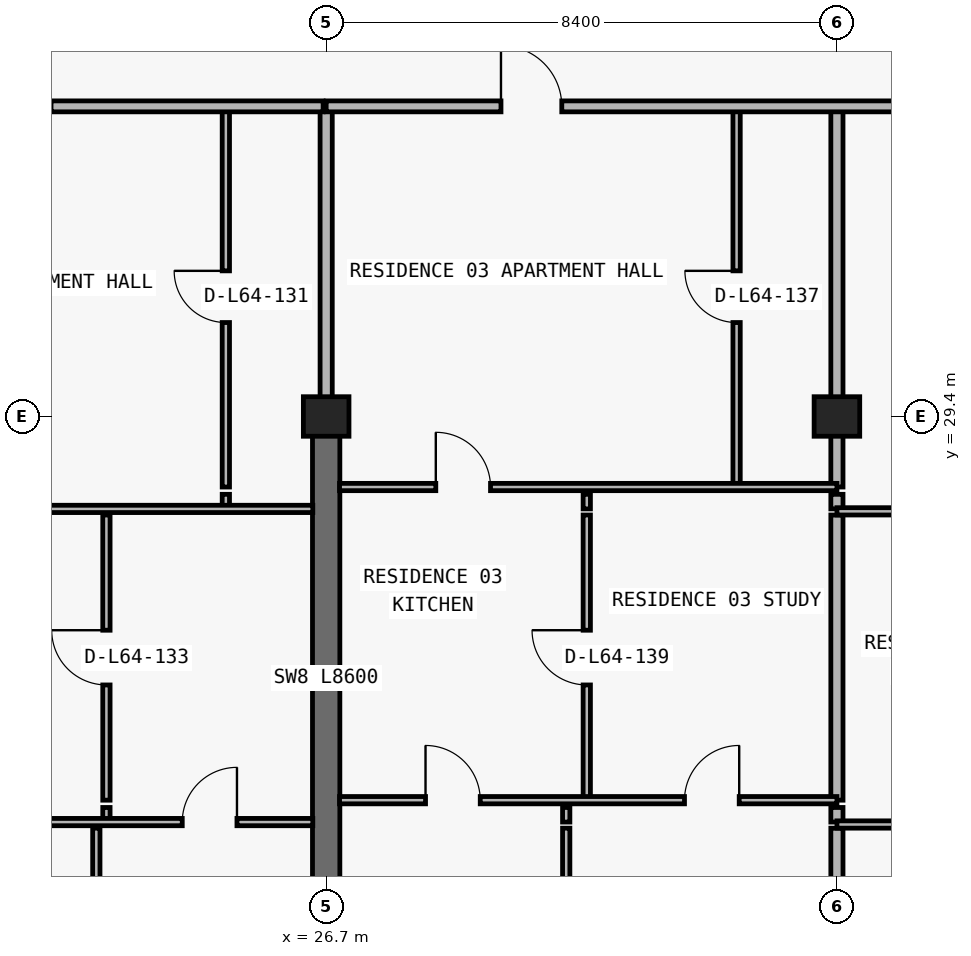
"""IFC4 building model, lengths in metres.
Left out: names, types, materials, properties, quantities, classifications, styles, units other than length and angle.
Written with IfcOpenShell. Run it as: python <this file> out.ifc"""

import sys

from ifc_helpers import new_model, si_unit, direction, frame, frame_2d, origin, origin_2d, place, context, subcontext, project, spatial, rectangle, extrude, element, fill, save


model = new_model("IFC4")
c1 = context("Model", 3, precision=1e-05, world=origin(), true_north=direction((0.0, 1.0)))
c2 = subcontext(c1, "Body", "Model", "MODEL_VIEW")
j1 = project(units=[si_unit("LENGTHUNIT", "METRE"), si_unit("PLANEANGLEUNIT", "RADIAN")], contexts=[c1])
p1 = place(None, origin())
s1 = spatial("IfcSite", under=j1, at=p1, CompositionType="ELEMENT")
p2 = place(p1, origin())
s2 = spatial("IfcBuilding", under=s1, at=p2, CompositionType="ELEMENT")
p3 = place(p2, frame((0.0, 0.0, 229.8)))
s3 = spatial("IfcBuildingStorey", under=s2, at=p3, CompositionType="ELEMENT", Elevation=229.8)
for number, where, z_axis, x_axis in (
    (1, (26.7, 29.4, 0.0), (0.0, 0.0, 1.0), (1.0, 0.0, 0.0)),
    (2, (35.1, 29.4, 0.0), (0.0, 0.0, 1.0), (1.0, 0.0, 0.0)),
):
    element("IfcColumn", number, at=place(p3, frame(where, z_axis=z_axis, x_axis=x_axis)), inside=s3, PredefinedType="COLUMN", context=c2, shape_type="SweptSolid", body=[
        extrude(rectangle(XDim=0.75, YDim=0.65, at=origin_2d()), origin(), (0.0, 0.0, 1.0), 3.05),
    ])
p4 = place(p3, frame((26.7, 20.8, 0.0), z_axis=(0.0, 0.0, 1.0), x_axis=(0.0, 1.0, 0.0)))
e3 = element("IfcWall", 3, at=p4, inside=s3, PredefinedType="SHEAR", context=c2, shape_type="SweptSolid", body=[
    extrude(rectangle(XDim=8.6, YDim=0.45, at=frame_2d((4.3, 0.0))), origin(), (0.0, 0.0, 1.0), 3.05),
])
p5 = place(p3, frame((22.92, 13.34, 0.0), z_axis=(0.0, 0.0, 1.0), x_axis=(0.0, 1.0, 0.0)))
e4 = element("IfcWall", 4, at=p5, inside=s3, PredefinedType="PARTITIONING", context=c2, shape_type="SweptSolid", body=[
    extrude(rectangle(XDim=9.29, YDim=0.12, at=frame_2d((4.645, 0.0))), origin(), (0.0, 0.0, 1.0), 3.05),
])
p6 = place(p3, frame((23.086, 22.73, 0.0), z_axis=(0.0, 0.0, 1.0), x_axis=(0.0, 1.0, 0.0)))
e5 = element("IfcWall", 5, at=p6, inside=s3, PredefinedType="PARTITIONING", context=c2, shape_type="SweptSolid", body=[
    extrude(rectangle(XDim=0.24, YDim=0.12, at=frame_2d((0.12, 0.0))), origin(), (0.0, 0.0, 1.0), 3.05),
])
p7 = place(p3, frame((23.086, 23.09, 0.0), z_axis=(0.0, 0.0, 1.0), x_axis=(0.0, 1.0, 0.0)))
e6 = element("IfcWall", 6, at=p7, inside=s3, PredefinedType="PARTITIONING", context=c2, shape_type="SweptSolid", body=[
    extrude(rectangle(XDim=4.69, YDim=0.12, at=frame_2d((2.345, 0.0))), origin(), (0.0, 0.0, 1.0), 3.05),
])
p8 = place(p7, frame((1.895, 0.0, 0.0)))
e7 = element("IfcOpeningElement", 7, at=p8, cuts=e6, PredefinedType="OPENING", context=c2, shape_type="SweptSolid", body=[
    extrude(rectangle(XDim=0.9, YDim=2.15, at=frame_2d((0.45, 1.075))), frame((0.0, 0.07, 0.0), z_axis=(0.0, -1.0, 0.0), x_axis=(1.0, 0.0, 0.0)), (0.0, 0.0, 1.0), 0.14),
])
p9 = place(p3, frame((25.05, 27.88, 0.0), z_axis=(0.0, 0.0, 1.0), x_axis=(0.0, 1.0, 0.0)))
e8 = element("IfcWall", 8, at=p9, inside=s3, PredefinedType="PARTITIONING", context=c2, shape_type="SweptSolid", body=[
    extrude(rectangle(XDim=0.24, YDim=0.12, at=frame_2d((0.12, 0.0))), origin(), (0.0, 0.0, 1.0), 3.05),
])
p10 = place(p3, frame((25.05, 28.24, 0.0), z_axis=(0.0, 0.0, 1.0), x_axis=(0.0, 1.0, 0.0)))
e9 = element("IfcWall", 9, at=p10, inside=s3, PredefinedType="PARTITIONING", context=c2, shape_type="SweptSolid", body=[
    extrude(rectangle(XDim=6.26, YDim=0.12, at=frame_2d((3.13, 0.0))), origin(), (0.0, 0.0, 1.0), 3.05),
])
p11 = place(p10, frame((2.705, 0.0, 0.0)))
e10 = element("IfcOpeningElement", 10, at=p11, cuts=e9, PredefinedType="OPENING", context=c2, shape_type="SweptSolid", body=[
    extrude(rectangle(XDim=0.85, YDim=2.1, at=frame_2d((0.425, 1.05))), frame((0.0, 0.07, 0.0), z_axis=(0.0, -1.0, 0.0), x_axis=(1.0, 0.0, 0.0)), (0.0, 0.0, 1.0), 0.14),
])
p12 = place(p3, frame((26.7, 29.405, 0.0), z_axis=(0.0, 0.0, 1.0), x_axis=(0.0, 1.0, 0.0)))
e11 = element("IfcWall", 11, at=p12, inside=s3, PredefinedType="PARTITIONING", context=c2, shape_type="SweptSolid", body=[
    extrude(rectangle(XDim=5.095, YDim=0.2, at=frame_2d((2.547, 0.0))), origin(), (0.0, 0.0, 1.0), 2.335),
])
p13 = place(p3, frame((30.648, 13.34, 0.0), z_axis=(0.0, 0.0, 1.0), x_axis=(0.0, 1.0, 0.0)))
e12 = element("IfcWall", 12, at=p13, inside=s3, PredefinedType="PARTITIONING", context=c2, shape_type="SweptSolid", body=[
    extrude(rectangle(XDim=9.29, YDim=0.12, at=frame_2d((4.645, 0.0))), origin(), (0.0, 0.0, 1.0), 3.05),
])
p14 = place(p3, frame((30.648, 22.73, 0.0), z_axis=(0.0, 0.0, 1.0), x_axis=(0.0, 1.0, 0.0)))
e13 = element("IfcWall", 13, at=p14, inside=s3, PredefinedType="PARTITIONING", context=c2, shape_type="SweptSolid", body=[
    extrude(rectangle(XDim=0.24, YDim=0.12, at=frame_2d((0.12, 0.0))), origin(), (0.0, 0.0, 1.0), 3.05),
])
p15 = place(p3, frame((30.986, 23.09, 0.0), z_axis=(0.0, 0.0, 1.0), x_axis=(0.0, 1.0, 0.0)))
e14 = element("IfcWall", 14, at=p15, inside=s3, PredefinedType="PARTITIONING", context=c2, shape_type="SweptSolid", body=[
    extrude(rectangle(XDim=4.69, YDim=0.12, at=frame_2d((2.345, 0.0))), origin(), (0.0, 0.0, 1.0), 3.05),
])
p16 = place(p15, frame((1.895, 0.0, 0.0)))
e15 = element("IfcOpeningElement", 15, at=p16, cuts=e14, PredefinedType="OPENING", context=c2, shape_type="SweptSolid", body=[
    extrude(rectangle(XDim=0.9, YDim=2.15, at=frame_2d((0.45, 1.075))), frame((0.0, 0.07, 0.0), z_axis=(0.0, -1.0, 0.0), x_axis=(1.0, 0.0, 0.0)), (0.0, 0.0, 1.0), 0.14),
])
p17 = place(p3, frame((30.986, 27.88, 0.0), z_axis=(0.0, 0.0, 1.0), x_axis=(0.0, 1.0, 0.0)))
e16 = element("IfcWall", 16, at=p17, inside=s3, PredefinedType="PARTITIONING", context=c2, shape_type="SweptSolid", body=[
    extrude(rectangle(XDim=0.24, YDim=0.12, at=frame_2d((0.12, 0.0))), origin(), (0.0, 0.0, 1.0), 3.05),
])
p18 = place(p3, frame((33.45, 28.24, 0.0), z_axis=(0.0, 0.0, 1.0), x_axis=(0.0, 1.0, 0.0)))
e17 = element("IfcWall", 17, at=p18, inside=s3, PredefinedType="PARTITIONING", context=c2, shape_type="SweptSolid", body=[
    extrude(rectangle(XDim=6.26, YDim=0.12, at=frame_2d((3.13, 0.0))), origin(), (0.0, 0.0, 1.0), 3.05),
])
p19 = place(p18, frame((2.705, 0.0, 0.0)))
e18 = element("IfcOpeningElement", 18, at=p19, cuts=e17, PredefinedType="OPENING", context=c2, shape_type="SweptSolid", body=[
    extrude(rectangle(XDim=0.85, YDim=2.1, at=frame_2d((0.425, 1.05))), frame((0.0, 0.07, 0.0), z_axis=(0.0, -1.0, 0.0), x_axis=(1.0, 0.0, 0.0)), (0.0, 0.0, 1.0), 0.14),
])
p20 = place(p3, frame((35.1, 13.34, 0.0), z_axis=(0.0, 0.0, 1.0), x_axis=(0.0, 1.0, 0.0)))
e19 = element("IfcWall", 19, at=p20, inside=s3, PredefinedType="PARTITIONING", context=c2, shape_type="SweptSolid", body=[
    extrude(rectangle(XDim=9.29, YDim=0.2, at=frame_2d((4.645, 0.0))), origin(), (0.0, 0.0, 1.0), 2.263),
])
p21 = place(p3, frame((35.1, 22.73, 0.0), z_axis=(0.0, 0.0, 1.0), x_axis=(0.0, 1.0, 0.0)))
e20 = element("IfcWall", 20, at=p21, inside=s3, PredefinedType="PARTITIONING", context=c2, shape_type="SweptSolid", body=[
    extrude(rectangle(XDim=0.24, YDim=0.2, at=frame_2d((0.12, 0.0))), origin(), (0.0, 0.0, 1.0), 2.263),
])
p22 = place(p3, frame((35.1, 23.09, 0.0), z_axis=(0.0, 0.0, 1.0), x_axis=(0.0, 1.0, 0.0)))
e21 = element("IfcWall", 21, at=p22, inside=s3, PredefinedType="PARTITIONING", context=c2, shape_type="SweptSolid", body=[
    extrude(rectangle(XDim=4.69, YDim=0.2, at=frame_2d((2.345, 0.0))), origin(), (0.0, 0.0, 1.0), 2.263),
])
p23 = place(p3, frame((35.1, 27.88, 0.0), z_axis=(0.0, 0.0, 1.0), x_axis=(0.0, 1.0, 0.0)))
e22 = element("IfcWall", 22, at=p23, inside=s3, PredefinedType="PARTITIONING", context=c2, shape_type="SweptSolid", body=[
    extrude(rectangle(XDim=0.24, YDim=0.2, at=frame_2d((0.12, 0.0))), origin(), (0.0, 0.0, 1.0), 2.263),
])
p24 = place(p3, frame((35.1, 28.24, 0.0), z_axis=(0.0, 0.0, 1.0), x_axis=(0.0, 1.0, 0.0)))
e23 = element("IfcWall", 23, at=p24, inside=s3, PredefinedType="PARTITIONING", context=c2, shape_type="SweptSolid", body=[
    extrude(rectangle(XDim=6.26, YDim=0.2, at=frame_2d((3.13, 0.0))), origin(), (0.0, 0.0, 1.0), 2.263),
])
p25 = place(p3, frame((35.1, 22.69, 0.0), z_axis=(0.0, 0.0, 1.0), x_axis=(1.0, 0.0, 0.0)))
e24 = element("IfcWall", 24, at=p25, inside=s3, PredefinedType="PARTITIONING", context=c2, shape_type="SweptSolid", body=[
    extrude(rectangle(XDim=4.104, YDim=0.12, at=frame_2d((2.052, 0.0))), origin(), (0.0, 0.0, 1.0), 3.05),
])
p26 = place(p25, frame((1.602, 0.0, 0.0)))
e25 = element("IfcOpeningElement", 25, at=p26, cuts=e24, PredefinedType="OPENING", context=c2, shape_type="SweptSolid", body=[
    extrude(rectangle(XDim=0.9, YDim=2.15, at=frame_2d((0.45, 1.075))), frame((0.0, 0.07, 0.0), z_axis=(0.0, -1.0, 0.0), x_axis=(1.0, 0.0, 0.0)), (0.0, 0.0, 1.0), 0.14),
])
p27 = place(p3, frame((18.3, 22.73, 0.0), z_axis=(0.0, 0.0, 1.0), x_axis=(1.0, 0.0, 0.0)))
e26 = element("IfcWall", 26, at=p27, inside=s3, PredefinedType="PARTITIONING", context=c2, shape_type="SweptSolid", body=[
    extrude(rectangle(XDim=8.18, YDim=0.12, at=frame_2d((4.09, 0.0))), origin(), (0.0, 0.0, 1.0), 3.05),
])
p28 = place(p27, frame((1.86, 0.0, 0.0)))
e27 = element("IfcOpeningElement", 27, at=p28, cuts=e26, PredefinedType="OPENING", context=c2, shape_type="SweptSolid", body=[
    extrude(rectangle(XDim=0.9, YDim=2.15, at=frame_2d((0.45, 1.075))), frame((0.0, 0.07, 0.0), z_axis=(0.0, -1.0, 0.0), x_axis=(1.0, 0.0, 0.0)), (0.0, 0.0, 1.0), 0.14),
])
p29 = place(p27, frame((6.033, 0.0, 0.0)))
e28 = element("IfcOpeningElement", 28, at=p29, cuts=e26, PredefinedType="OPENING", context=c2, shape_type="SweptSolid", body=[
    extrude(rectangle(XDim=0.9, YDim=2.15, at=frame_2d((0.45, 1.075))), frame((0.0, 0.07, 0.0), z_axis=(0.0, -1.0, 0.0), x_axis=(1.0, 0.0, 0.0)), (0.0, 0.0, 1.0), 0.14),
])
p30 = place(p3, frame((26.92, 23.09, 0.0), z_axis=(0.0, 0.0, 1.0), x_axis=(1.0, 0.0, 0.0)))
e29 = element("IfcWall", 29, at=p30, inside=s3, PredefinedType="PARTITIONING", context=c2, shape_type="SweptSolid", body=[
    extrude(rectangle(XDim=8.18, YDim=0.12, at=frame_2d((4.09, 0.0))), origin(), (0.0, 0.0, 1.0), 3.05),
])
p31 = place(p30, frame((1.414, 0.0, 0.0)))
e30 = element("IfcOpeningElement", 30, at=p31, cuts=e29, PredefinedType="OPENING", context=c2, shape_type="SweptSolid", body=[
    extrude(rectangle(XDim=0.9, YDim=2.15, at=frame_2d((0.45, 1.075))), frame((0.0, 0.07, 0.0), z_axis=(0.0, -1.0, 0.0), x_axis=(1.0, 0.0, 0.0)), (0.0, 0.0, 1.0), 0.14),
])
p32 = place(p30, frame((5.673, 0.0, 0.0)))
e31 = element("IfcOpeningElement", 31, at=p32, cuts=e29, PredefinedType="OPENING", context=c2, shape_type="SweptSolid", body=[
    extrude(rectangle(XDim=0.9, YDim=2.15, at=frame_2d((0.45, 1.075))), frame((0.0, 0.07, 0.0), z_axis=(0.0, -1.0, 0.0), x_axis=(1.0, 0.0, 0.0)), (0.0, 0.0, 1.0), 0.14),
])
p33 = place(p3, frame((35.1, 27.84, 0.0), z_axis=(0.0, 0.0, 1.0), x_axis=(1.0, 0.0, 0.0)))
e32 = element("IfcWall", 32, at=p33, inside=s3, PredefinedType="PARTITIONING", context=c2, shape_type="SweptSolid", body=[
    extrude(rectangle(XDim=4.104, YDim=0.12, at=frame_2d((2.052, 0.0))), origin(), (0.0, 0.0, 1.0), 3.05),
])
p34 = place(p33, frame((1.602, 0.0, 0.0)))
e33 = element("IfcOpeningElement", 33, at=p34, cuts=e32, PredefinedType="OPENING", context=c2, shape_type="SweptSolid", body=[
    extrude(rectangle(XDim=0.9, YDim=2.15, at=frame_2d((0.45, 1.075))), frame((0.0, 0.07, 0.0), z_axis=(0.0, -1.0, 0.0), x_axis=(1.0, 0.0, 0.0)), (0.0, 0.0, 1.0), 0.14),
])
p35 = place(p3, frame((18.3, 27.88, 0.0), z_axis=(0.0, 0.0, 1.0), x_axis=(1.0, 0.0, 0.0)))
e34 = element("IfcWall", 34, at=p35, inside=s3, PredefinedType="PARTITIONING", context=c2, shape_type="SweptSolid", body=[
    extrude(rectangle(XDim=8.18, YDim=0.12, at=frame_2d((4.09, 0.0))), origin(), (0.0, 0.0, 1.0), 3.05),
])
p36 = place(p35, frame((1.943, 0.0, 0.0)))
e35 = element("IfcOpeningElement", 35, at=p36, cuts=e34, PredefinedType="OPENING", context=c2, shape_type="SweptSolid", body=[
    extrude(rectangle(XDim=0.9, YDim=2.15, at=frame_2d((0.45, 1.075))), frame((0.0, 0.07, 0.0), z_axis=(0.0, -1.0, 0.0), x_axis=(1.0, 0.0, 0.0)), (0.0, 0.0, 1.0), 0.14),
])
p37 = place(p3, frame((26.92, 28.24, 0.0), z_axis=(0.0, 0.0, 1.0), x_axis=(1.0, 0.0, 0.0)))
e36 = element("IfcWall", 36, at=p37, inside=s3, PredefinedType="PARTITIONING", context=c2, shape_type="SweptSolid", body=[
    extrude(rectangle(XDim=8.18, YDim=0.12, at=frame_2d((4.09, 0.0))), origin(), (0.0, 0.0, 1.0), 3.05),
])
p38 = place(p37, frame((1.583, 0.0, 0.0)))
e37 = element("IfcOpeningElement", 37, at=p38, cuts=e36, PredefinedType="OPENING", context=c2, shape_type="SweptSolid", body=[
    extrude(rectangle(XDim=0.9, YDim=2.15, at=frame_2d((0.45, 1.075))), frame((0.0, 0.07, 0.0), z_axis=(0.0, -1.0, 0.0), x_axis=(1.0, 0.0, 0.0)), (0.0, 0.0, 1.0), 0.14),
])
p39 = place(p3, frame((12.105, 34.5, 0.0), z_axis=(0.0, 0.0, 1.0), x_axis=(1.0, 0.0, 0.0)))
e38 = element("IfcWall", 38, at=p39, inside=s3, PredefinedType="PARTITIONING", context=c2, shape_type="SweptSolid", body=[
    extrude(rectangle(XDim=14.545, YDim=0.18, at=frame_2d((7.272, 0.0))), origin(), (0.0, 0.0, 1.0), 3.05),
])
p40 = place(p39, frame((1.772, 0.0, 0.0)))
e39 = element("IfcOpeningElement", 39, at=p40, cuts=e38, PredefinedType="OPENING", context=c2, shape_type="SweptSolid", body=[
    extrude(rectangle(XDim=1.0, YDim=2.2, at=frame_2d((0.5, 1.1))), frame((0.0, 0.1, 0.0), z_axis=(0.0, -1.0, 0.0), x_axis=(1.0, 0.0, 0.0)), (0.0, 0.0, 1.0), 0.2),
])
p41 = place(p39, frame((9.07, 0.0, 0.0)))
e40 = element("IfcOpeningElement", 40, at=p41, cuts=e38, PredefinedType="OPENING", context=c2, shape_type="SweptSolid", body=[
    extrude(rectangle(XDim=1.0, YDim=2.2, at=frame_2d((0.5, 1.1))), frame((0.0, 0.1, 0.0), z_axis=(0.0, -1.0, 0.0), x_axis=(1.0, 0.0, 0.0)), (0.0, 0.0, 1.0), 0.2),
])
p42 = place(p3, frame((26.7, 34.5, 0.0), z_axis=(0.0, 0.0, 1.0), x_axis=(1.0, 0.0, 0.0)))
e41 = element("IfcWall", 41, at=p42, inside=s3, PredefinedType="PARTITIONING", context=c2, shape_type="SweptSolid", body=[
    extrude(rectangle(XDim=12.504, YDim=0.18, at=frame_2d((6.252, 0.0))), origin(), (0.0, 0.0, 1.0), 3.05),
])
p43 = place(p42, frame((2.875, 0.0, 0.0)))
e42 = element("IfcOpeningElement", 42, at=p43, cuts=e41, PredefinedType="OPENING", context=c2, shape_type="SweptSolid", body=[
    extrude(rectangle(XDim=1.0, YDim=2.2, at=frame_2d((0.5, 1.1))), frame((0.0, 0.1, 0.0), z_axis=(0.0, -1.0, 0.0), x_axis=(1.0, 0.0, 0.0)), (0.0, 0.0, 1.0), 0.2),
])
p44 = place(p42, frame((9.952, 0.0, 0.0)))
e43 = element("IfcOpeningElement", 43, at=p44, cuts=e41, PredefinedType="OPENING", context=c2, shape_type="SweptSolid", body=[
    extrude(rectangle(XDim=1.0, YDim=2.2, at=frame_2d((0.5, 1.1))), frame((0.0, 0.1, 0.0), z_axis=(0.0, -1.0, 0.0), x_axis=(1.0, 0.0, 0.0)), (0.0, 0.0, 1.0), 0.2),
])
p45 = place(p11, origin())
e44 = element("IfcDoor", 44, at=p45, inside=s3, OperationType="SINGLE_SWING_RIGHT", PredefinedType="DOOR", context=c2, shape_type="SweptSolid", body=[
    extrude(rectangle(XDim=0.85, YDim=2.1, at=frame_2d((0.425, 1.05))), frame((0.0, 0.025, 0.0), z_axis=(0.0, -1.0, 0.0), x_axis=(1.0, 0.0, 0.0)), (0.0, 0.0, 1.0), 0.05),
])
fill(e10, e44)
p46 = place(p8, origin())
e45 = element("IfcDoor", 45, at=p46, inside=s3, OperationType="SINGLE_SWING_RIGHT", PredefinedType="DOOR", context=c2, shape_type="SweptSolid", body=[
    extrude(rectangle(XDim=0.9, YDim=2.15, at=frame_2d((0.45, 1.075))), frame((0.0, 0.025, 0.0), z_axis=(0.0, -1.0, 0.0), x_axis=(1.0, 0.0, 0.0)), (0.0, 0.0, 1.0), 0.05),
])
fill(e7, e45)
p47 = place(p29, origin())
e46 = element("IfcDoor", 46, at=p47, inside=s3, OperationType="SINGLE_SWING_RIGHT", PredefinedType="DOOR", context=c2, shape_type="SweptSolid", body=[
    extrude(rectangle(XDim=0.9, YDim=2.15, at=frame_2d((0.45, 1.075))), frame((0.0, 0.025, 0.0), z_axis=(0.0, -1.0, 0.0), x_axis=(1.0, 0.0, 0.0)), (0.0, 0.0, 1.0), 0.05),
])
fill(e28, e46)
p48 = place(p43, origin())
e47 = element("IfcDoor", 47, at=p48, inside=s3, OperationType="SINGLE_SWING_LEFT", PredefinedType="DOOR", context=c2, shape_type="SweptSolid", body=[
    extrude(rectangle(XDim=1.0, YDim=2.2, at=frame_2d((0.5, 1.1))), frame((0.0, 0.025, 0.0), z_axis=(0.0, -1.0, 0.0), x_axis=(1.0, 0.0, 0.0)), (0.0, 0.0, 1.0), 0.05),
])
fill(e42, e47)
p49 = place(p19, origin())
e48 = element("IfcDoor", 48, at=p49, inside=s3, OperationType="SINGLE_SWING_RIGHT", PredefinedType="DOOR", context=c2, shape_type="SweptSolid", body=[
    extrude(rectangle(XDim=0.85, YDim=2.1, at=frame_2d((0.425, 1.05))), frame((0.0, 0.025, 0.0), z_axis=(0.0, -1.0, 0.0), x_axis=(1.0, 0.0, 0.0)), (0.0, 0.0, 1.0), 0.05),
])
fill(e18, e48)
p50 = place(p38, origin())
e49 = element("IfcDoor", 49, at=p50, inside=s3, OperationType="SINGLE_SWING_LEFT", PredefinedType="DOOR", context=c2, shape_type="SweptSolid", body=[
    extrude(rectangle(XDim=0.9, YDim=2.15, at=frame_2d((0.45, 1.075))), frame((0.0, 0.025, 0.0), z_axis=(0.0, -1.0, 0.0), x_axis=(1.0, 0.0, 0.0)), (0.0, 0.0, 1.0), 0.05),
])
fill(e37, e49)
p51 = place(p16, origin())
e50 = element("IfcDoor", 50, at=p51, inside=s3, OperationType="SINGLE_SWING_RIGHT", PredefinedType="DOOR", context=c2, shape_type="SweptSolid", body=[
    extrude(rectangle(XDim=0.9, YDim=2.15, at=frame_2d((0.45, 1.075))), frame((0.0, 0.025, 0.0), z_axis=(0.0, -1.0, 0.0), x_axis=(1.0, 0.0, 0.0)), (0.0, 0.0, 1.0), 0.05),
])
fill(e15, e50)
p52 = place(p31, origin())
e51 = element("IfcDoor", 51, at=p52, inside=s3, OperationType="SINGLE_SWING_LEFT", PredefinedType="DOOR", context=c2, shape_type="SweptSolid", body=[
    extrude(rectangle(XDim=0.9, YDim=2.15, at=frame_2d((0.45, 1.075))), frame((0.0, 0.025, 0.0), z_axis=(0.0, -1.0, 0.0), x_axis=(1.0, 0.0, 0.0)), (0.0, 0.0, 1.0), 0.05),
])
fill(e30, e51)
p53 = place(p32, origin())
e52 = element("IfcDoor", 52, at=p53, inside=s3, OperationType="SINGLE_SWING_RIGHT", PredefinedType="DOOR", context=c2, shape_type="SweptSolid", body=[
    extrude(rectangle(XDim=0.9, YDim=2.15, at=frame_2d((0.45, 1.075))), frame((0.0, 0.025, 0.0), z_axis=(0.0, -1.0, 0.0), x_axis=(1.0, 0.0, 0.0)), (0.0, 0.0, 1.0), 0.05),
])
fill(e31, e52)
save(model, sys.argv[1])
